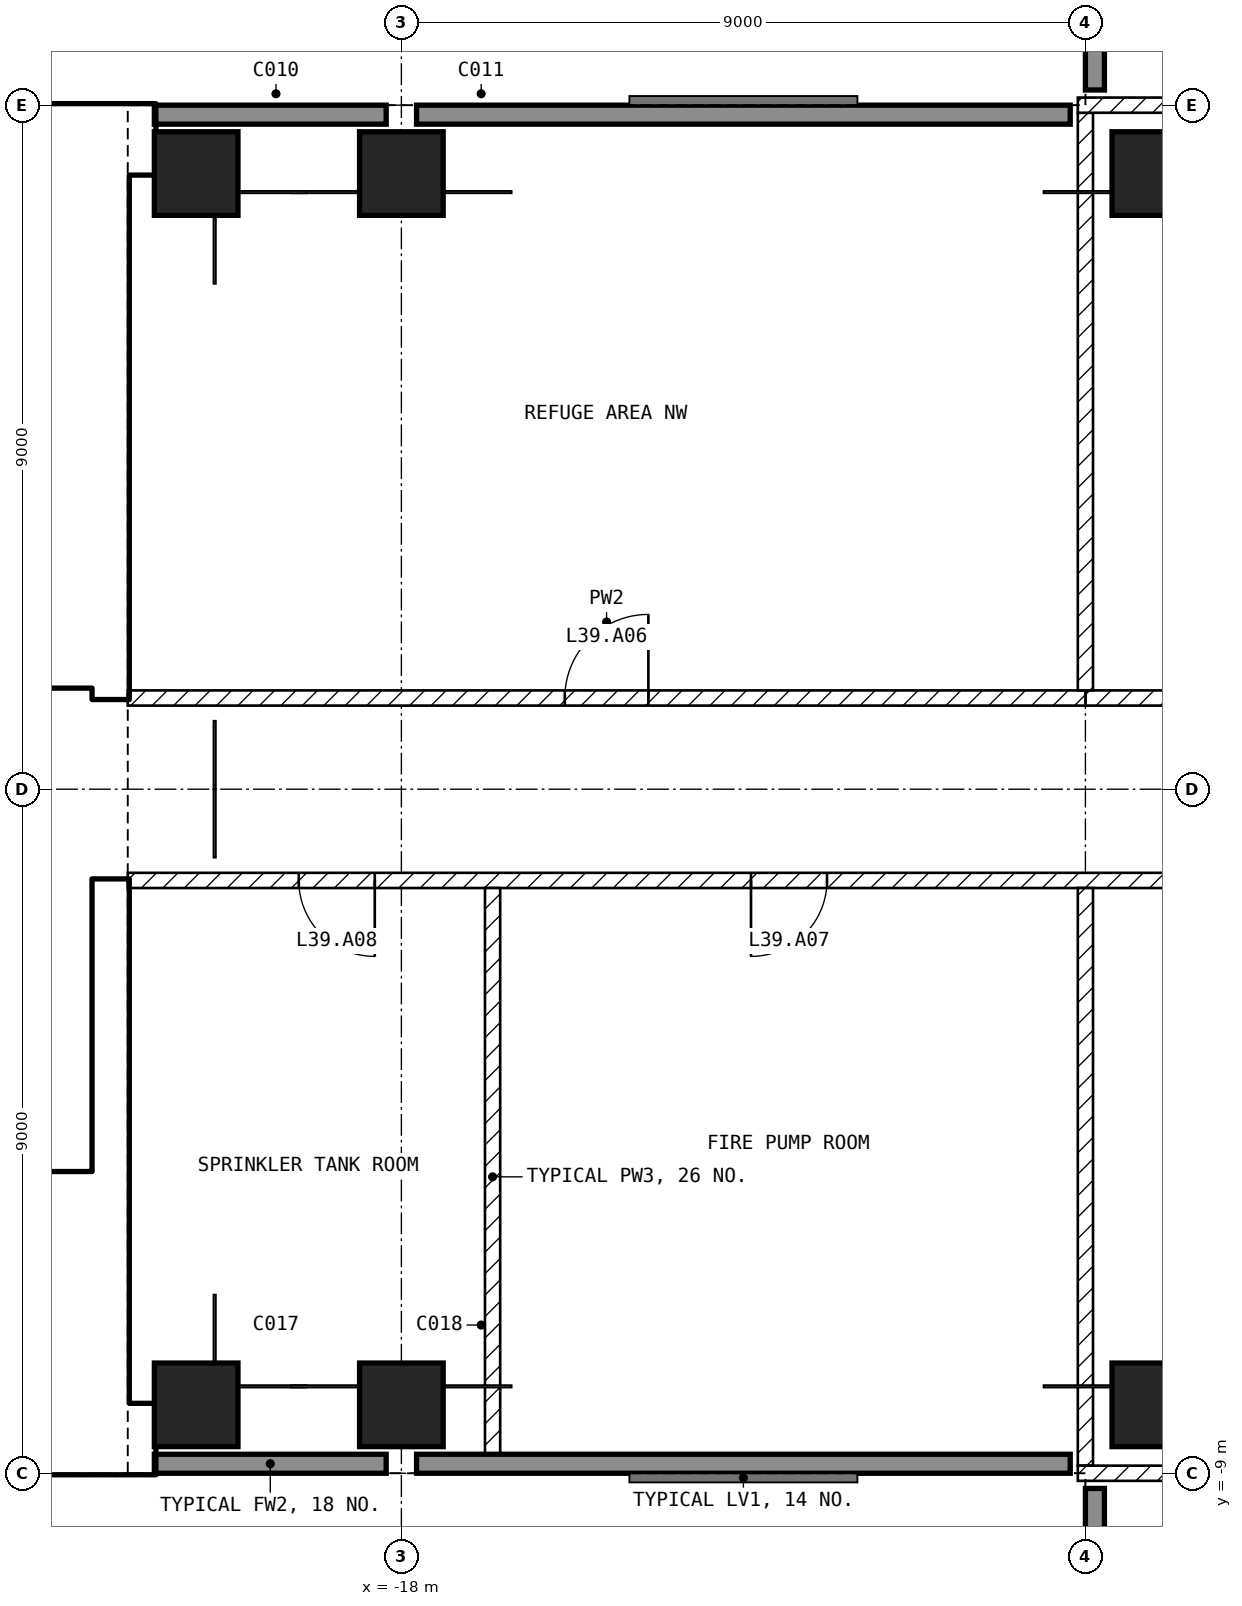
"""IFC4 building model, lengths in metres.
Left out: names, types, materials, properties, quantities, classifications, styles, units other than length and angle.
Written with IfcOpenShell. Run it as: python <this file> out.ifc"""

import sys

from ifc_helpers import new_model, si_unit, direction, frame, frame_2d, origin, origin_2d, place, context, subcontext, project, spatial, rectangle, extrude, element, fill, save


model = new_model("IFC4")
c1 = context("Model", 3, precision=1e-05, world=origin(), true_north=direction((0.0, 1.0)))
c2 = subcontext(c1, "Body", "Model", "MODEL_VIEW")
j1 = project(units=[si_unit("LENGTHUNIT", "METRE"), si_unit("PLANEANGLEUNIT", "RADIAN")], contexts=[c1])
p1 = place(None, origin())
s1 = spatial("IfcSite", under=j1, at=p1, CompositionType="ELEMENT")
p2 = place(p1, origin())
s2 = spatial("IfcBuilding", under=s1, at=p2, CompositionType="ELEMENT")
p3 = place(p2, frame((0.0, 0.0, 162.1)))
s3 = spatial("IfcBuildingStorey", under=s2, at=p3, CompositionType="ELEMENT", Elevation=162.1)
for number, where, z_axis, x_axis in (
    (1, (-20.7, -8.1, -0.45), (0.0, 0.0, 1.0), (1.0, 0.0, 0.0)),
    (2, (-20.7, 8.1, -0.45), (0.0, 0.0, 1.0), (1.0, 0.0, 0.0)),
    (3, (-18.0, -8.1, -0.45), (0.0, 0.0, 1.0), (1.0, 0.0, 0.0)),
    (4, (-18.0, 8.1, -0.45), (0.0, 0.0, 1.0), (1.0, 0.0, 0.0)),
    (5, (-8.1, -8.1, -0.45), (0.0, 0.0, 1.0), (1.0, 0.0, 0.0)),
    (6, (-8.1, 8.1, -0.45), (0.0, 0.0, 1.0), (1.0, 0.0, 0.0)),
):
    element("IfcColumn", number, at=place(p3, frame(where, z_axis=z_axis, x_axis=x_axis)), inside=s3, PredefinedType="COLUMN", context=c2, shape_type="SweptSolid", body=[
        extrude(rectangle(XDim=1.1, YDim=1.1, at=origin_2d()), origin(), (0.0, 0.0, 1.0), 4.7),
    ])
p4 = place(p3, frame((-8.875, 17.8, 0.0), z_axis=(0.0, 0.0, 1.0), x_axis=(0.0, -1.0, 0.0)))
e7 = element("IfcWall", 7, at=p4, inside=s3, PredefinedType="SOLIDWALL", context=c2, shape_type="SweptSolid", body=[
    extrude(rectangle(XDim=8.6, YDim=0.25, at=frame_2d((4.3, 0.0))), origin(), (0.0, 0.0, 1.0), 4.25),
])
p5 = place(p4, frame((2.8, 0.0, 1.0)))
e8 = element("IfcOpeningElement", 8, at=p5, cuts=e7, PredefinedType="OPENING", context=c2, shape_type="SweptSolid", body=[
    extrude(rectangle(XDim=3.0, YDim=2.4, at=frame_2d((1.5, 1.2))), frame((0.0, 0.135, 0.0), z_axis=(0.0, -1.0, 0.0), x_axis=(1.0, 0.0, 0.0)), (0.0, 0.0, 1.0), 0.27),
])
p6 = place(p3, frame((-9.2, 8.875, 0.0), z_axis=(0.0, 0.0, 1.0), x_axis=(-1.0, 0.0, 0.0)))
e9 = element("IfcWall", 9, at=p6, inside=s3, PredefinedType="SOLIDWALL", context=c2, shape_type="SweptSolid", body=[
    extrude(rectangle(XDim=8.6, YDim=0.25, at=frame_2d((4.3, 0.0))), origin(), (0.0, 0.0, 1.0), 4.25),
])
for number, where, z_axis, x_axis in (
    (10, (-18.2, 8.875, 0.0), (0.0, 0.0, 1.0), (-1.0, 0.0, 0.0)),
    (11, (-21.25, -8.875, 0.0), (0.0, 0.0, 1.0), (1.0, 0.0, 0.0)),
):
    element("IfcWall", number, at=place(p3, frame(where, z_axis=z_axis, x_axis=x_axis)), inside=s3, PredefinedType="SOLIDWALL", context=c2, shape_type="SweptSolid", body=[
        extrude(rectangle(XDim=3.05, YDim=0.25, at=frame_2d((1.525, 0.0))), origin(), (0.0, 0.0, 1.0), 4.25),
    ])
for number, where, z_axis, x_axis in (
    (12, (-17.8, -8.875, 0.0), (0.0, 0.0, 1.0), (1.0, 0.0, 0.0)),
    (13, (-8.875, -9.2, 0.0), (0.0, 0.0, 1.0), (0.0, -1.0, 0.0)),
):
    element("IfcWall", number, at=place(p3, frame(where, z_axis=z_axis, x_axis=x_axis)), inside=s3, PredefinedType="SOLIDWALL", context=c2, shape_type="SweptSolid", body=[
        extrude(rectangle(XDim=8.6, YDim=0.25, at=frame_2d((4.3, 0.0))), origin(), (0.0, 0.0, 1.0), 4.25),
    ])
p7 = place(p3, frame((-30.2, -8.55, 0.0), z_axis=(0.0, 0.0, 1.0), x_axis=(1.0, 0.0, 0.0)))
e14 = element("IfcWall", 14, at=p7, inside=s3, PredefinedType="SHEAR", context=c2, shape_type="SweptSolid", body=[
    extrude(rectangle(XDim=8.95, YDim=0.9, at=frame_2d((4.475, 0.0))), origin(), (0.0, 0.0, 1.0), 4.25),
])
p8 = place(p3, frame((-29.6, 8.55, 0.0), z_axis=(0.0, 0.0, 1.0), x_axis=(1.0, 0.0, 0.0)))
e15 = element("IfcWall", 15, at=p8, inside=s3, PredefinedType="SHEAR", context=c2, shape_type="SweptSolid", body=[
    extrude(rectangle(XDim=8.35, YDim=0.9, at=frame_2d((4.175, 0.0))), origin(), (0.0, 0.0, 1.0), 4.25),
])
for number, where, z_axis, x_axis in (
    (16, (-21.825, -8.1, 0.0), (0.0, 0.0, 1.0), (0.0, 1.0, 0.0)),
    (17, (-21.825, 1.2, 0.0), (0.0, 0.0, 1.0), (0.0, 1.0, 0.0)),
):
    element("IfcWall", number, at=place(p3, frame(where, z_axis=z_axis, x_axis=x_axis)), inside=s3, PredefinedType="SHEAR", context=c2, shape_type="SweptSolid", body=[
        extrude(rectangle(XDim=6.9, YDim=0.45, at=frame_2d((3.45, 0.0))), origin(), (0.0, 0.0, 1.0), 4.25),
    ])
p9 = place(p3, frame((-33.2, 1.45, 0.0), z_axis=(0.0, 0.0, 1.0), x_axis=(1.0, 0.0, 0.0)))
e18 = element("IfcWall", 18, at=p9, inside=s3, PredefinedType="SOLIDWALL", context=c2, shape_type="SweptSolid", body=[
    extrude(rectangle(XDim=11.15, YDim=0.2, at=frame_2d((5.575, 0.0))), origin(), (0.0, 0.0, 1.0), 4.25),
])
p10 = place(p9, frame((9.4, 0.0, 0.0)))
e19 = element("IfcOpeningElement", 19, at=p10, cuts=e18, PredefinedType="OPENING", context=c2, shape_type="SweptSolid", body=[
    extrude(rectangle(XDim=1.0, YDim=2.1, at=frame_2d((0.5, 1.05))), frame((0.0, 0.11, 0.0), z_axis=(0.0, -1.0, 0.0), x_axis=(1.0, 0.0, 0.0)), (0.0, 0.0, 1.0), 0.22),
])
p11 = place(p9, frame((6.9, 0.0, 0.0)))
e20 = element("IfcOpeningElement", 20, at=p11, cuts=e18, PredefinedType="OPENING", context=c2, shape_type="SweptSolid", body=[
    extrude(rectangle(XDim=1.0, YDim=2.1, at=frame_2d((0.5, 1.05))), frame((0.0, 0.11, 0.0), z_axis=(0.0, -1.0, 0.0), x_axis=(1.0, 0.0, 0.0)), (0.0, 0.0, 1.0), 0.22),
])
p12 = place(p9, frame((1.1, 0.0, 0.0)))
e21 = element("IfcOpeningElement", 21, at=p12, cuts=e18, PredefinedType="OPENING", context=c2, shape_type="SweptSolid", body=[
    extrude(rectangle(XDim=0.9, YDim=2.1, at=frame_2d((0.45, 1.05))), frame((0.0, 0.11, 0.0), z_axis=(0.0, -1.0, 0.0), x_axis=(1.0, 0.0, 0.0)), (0.0, 0.0, 1.0), 0.22),
])
p13 = place(p3, frame((-28.35, 5.15, 0.0), z_axis=(0.0, 0.0, 1.0), x_axis=(1.0, 0.0, 0.0)))
e22 = element("IfcWall", 22, at=p13, inside=s3, PredefinedType="SOLIDWALL", context=c2, shape_type="SweptSolid", body=[
    extrude(rectangle(XDim=6.3, YDim=0.2, at=frame_2d((3.15, 0.0))), origin(), (0.0, 0.0, 1.0), 4.25),
])
p14 = place(p13, frame((5.1, 0.0, 0.0)))
e23 = element("IfcOpeningElement", 23, at=p14, cuts=e22, PredefinedType="OPENING", context=c2, shape_type="SweptSolid", body=[
    extrude(rectangle(XDim=1.0, YDim=2.1, at=frame_2d((0.5, 1.05))), frame((0.0, 0.11, 0.0), z_axis=(0.0, -1.0, 0.0), x_axis=(1.0, 0.0, 0.0)), (0.0, 0.0, 1.0), 0.22),
])
p15 = place(p3, frame((-28.35, -5.15, 0.0), z_axis=(0.0, 0.0, 1.0), x_axis=(1.0, 0.0, 0.0)))
e24 = element("IfcWall", 24, at=p15, inside=s3, PredefinedType="SOLIDWALL", context=c2, shape_type="SweptSolid", body=[
    extrude(rectangle(XDim=6.3, YDim=0.2, at=frame_2d((3.15, 0.0))), origin(), (0.0, 0.0, 1.0), 4.25),
])
p16 = place(p15, frame((5.1, 0.0, 0.0)))
e25 = element("IfcOpeningElement", 25, at=p16, cuts=e24, PredefinedType="OPENING", context=c2, shape_type="SweptSolid", body=[
    extrude(rectangle(XDim=1.0, YDim=2.1, at=frame_2d((0.5, 1.05))), frame((0.0, 0.11, 0.0), z_axis=(0.0, -1.0, 0.0), x_axis=(1.0, 0.0, 0.0)), (0.0, 0.0, 1.0), 0.22),
])
p17 = place(p3, frame((-9.0, 1.2, 0.0), z_axis=(0.0, 0.0, 1.0), x_axis=(1.0, 0.0, 0.0)))
e26 = element("IfcWall", 26, at=p17, inside=s3, PredefinedType="PARTITIONING", context=c2, shape_type="SweptSolid", body=[
    extrude(rectangle(XDim=30.6, YDim=0.2, at=frame_2d((15.3, 0.0))), origin(), (0.0, 0.0, 1.0), 4.25),
])
p18 = place(p17, frame((8.5, 0.0, 0.0)))
e27 = element("IfcOpeningElement", 27, at=p18, cuts=e26, PredefinedType="OPENING", context=c2, shape_type="SweptSolid", body=[
    extrude(rectangle(XDim=1.0, YDim=2.1, at=frame_2d((0.5, 1.05))), frame((0.0, 0.11, 0.0), z_axis=(0.0, -1.0, 0.0), x_axis=(1.0, 0.0, 0.0)), (0.0, 0.0, 1.0), 0.22),
])
p19 = place(p17, frame((21.4, 0.0, 0.0)))
e28 = element("IfcOpeningElement", 28, at=p19, cuts=e26, PredefinedType="OPENING", context=c2, shape_type="SweptSolid", body=[
    extrude(rectangle(XDim=1.0, YDim=2.1, at=frame_2d((0.5, 1.05))), frame((0.0, 0.11, 0.0), z_axis=(0.0, -1.0, 0.0), x_axis=(1.0, 0.0, 0.0)), (0.0, 0.0, 1.0), 0.22),
])
p20 = place(p17, frame((27.35, 0.0, 0.0)))
e29 = element("IfcOpeningElement", 29, at=p20, cuts=e26, PredefinedType="OPENING", context=c2, shape_type="SweptSolid", body=[
    extrude(rectangle(XDim=1.0, YDim=2.1, at=frame_2d((0.5, 1.05))), frame((0.0, 0.11, 0.0), z_axis=(0.0, -1.0, 0.0), x_axis=(1.0, 0.0, 0.0)), (0.0, 0.0, 1.0), 0.22),
])
p21 = place(p3, frame((9.0, -1.2, 0.0), z_axis=(0.0, 0.0, 1.0), x_axis=(-1.0, 0.0, 0.0)))
e30 = element("IfcWall", 30, at=p21, inside=s3, PredefinedType="PARTITIONING", context=c2, shape_type="SweptSolid", body=[
    extrude(rectangle(XDim=30.6, YDim=0.2, at=frame_2d((15.3, 0.0))), origin(), (0.0, 0.0, 1.0), 4.25),
])
p22 = place(p21, frame((8.5, 0.0, 0.0)))
e31 = element("IfcOpeningElement", 31, at=p22, cuts=e30, PredefinedType="OPENING", context=c2, shape_type="SweptSolid", body=[
    extrude(rectangle(XDim=1.0, YDim=2.1, at=frame_2d((0.5, 1.05))), frame((0.0, 0.11, 0.0), z_axis=(0.0, -1.0, 0.0), x_axis=(1.0, 0.0, 0.0)), (0.0, 0.0, 1.0), 0.22),
])
p23 = place(p21, frame((21.4, 0.0, 0.0)))
e32 = element("IfcOpeningElement", 32, at=p23, cuts=e30, PredefinedType="OPENING", context=c2, shape_type="SweptSolid", body=[
    extrude(rectangle(XDim=1.0, YDim=2.1, at=frame_2d((0.5, 1.05))), frame((0.0, 0.11, 0.0), z_axis=(0.0, -1.0, 0.0), x_axis=(1.0, 0.0, 0.0)), (0.0, 0.0, 1.0), 0.22),
])
p24 = place(p21, frame((27.35, 0.0, 0.0)))
e33 = element("IfcOpeningElement", 33, at=p24, cuts=e30, PredefinedType="OPENING", context=c2, shape_type="SweptSolid", body=[
    extrude(rectangle(XDim=1.0, YDim=2.1, at=frame_2d((0.5, 1.05))), frame((0.0, 0.11, 0.0), z_axis=(0.0, -1.0, 0.0), x_axis=(1.0, 0.0, 0.0)), (0.0, 0.0, 1.0), 0.22),
])
p25 = place(p3, frame((-21.6, 1.2, 0.0), z_axis=(0.0, 0.0, 1.0), x_axis=(1.0, 0.0, 0.0)))
e34 = element("IfcWall", 34, at=p25, inside=s3, PredefinedType="PARTITIONING", context=c2, shape_type="SweptSolid", body=[
    extrude(rectangle(XDim=12.6, YDim=0.2, at=frame_2d((6.3, 0.0))), origin(), (0.0, 0.0, 1.0), 4.25),
])
p26 = place(p25, frame((5.75, 0.0, 0.0)))
e35 = element("IfcOpeningElement", 35, at=p26, cuts=e34, PredefinedType="OPENING", context=c2, shape_type="SweptSolid", body=[
    extrude(rectangle(XDim=1.1, YDim=2.1, at=frame_2d((0.55, 1.05))), frame((0.0, 0.11, 0.0), z_axis=(0.0, -1.0, 0.0), x_axis=(1.0, 0.0, 0.0)), (0.0, 0.0, 1.0), 0.22),
])
p27 = place(p3, frame((-9.0, 1.3, 0.0), z_axis=(0.0, 0.0, 1.0), x_axis=(0.0, 1.0, 0.0)))
e36 = element("IfcWall", 36, at=p27, inside=s3, PredefinedType="PARTITIONING", context=c2, shape_type="SweptSolid", body=[
    extrude(rectangle(XDim=7.6, YDim=0.2, at=frame_2d((3.8, 0.0))), origin(), (0.0, 0.0, 1.0), 4.25),
])
p28 = place(p3, frame((-9.1, 9.0, 0.0), z_axis=(0.0, 0.0, 1.0), x_axis=(1.0, 0.0, 0.0)))
e37 = element("IfcWall", 37, at=p28, inside=s3, PredefinedType="PARTITIONING", context=c2, shape_type="SweptSolid", body=[
    extrude(rectangle(XDim=18.2, YDim=0.2, at=frame_2d((9.1, 0.0))), origin(), (0.0, 0.0, 1.0), 4.25),
])
p29 = place(p28, frame((8.6, 0.0, 0.0)))
e38 = element("IfcOpeningElement", 38, at=p29, cuts=e37, PredefinedType="OPENING", context=c2, shape_type="SweptSolid", body=[
    extrude(rectangle(XDim=1.0, YDim=2.1, at=frame_2d((0.5, 1.05))), frame((0.0, 0.11, 0.0), z_axis=(0.0, -1.0, 0.0), x_axis=(1.0, 0.0, 0.0)), (0.0, 0.0, 1.0), 0.22),
])
p30 = place(p3, frame((-9.0, -8.9, 0.0), z_axis=(0.0, 0.0, 1.0), x_axis=(0.0, 1.0, 0.0)))
e39 = element("IfcWall", 39, at=p30, inside=s3, PredefinedType="PARTITIONING", context=c2, shape_type="SweptSolid", body=[
    extrude(rectangle(XDim=7.6, YDim=0.2, at=frame_2d((3.8, 0.0))), origin(), (0.0, 0.0, 1.0), 4.25),
])
p31 = place(p3, frame((9.1, -9.0, 0.0), z_axis=(0.0, 0.0, 1.0), x_axis=(-1.0, 0.0, 0.0)))
e40 = element("IfcWall", 40, at=p31, inside=s3, PredefinedType="PARTITIONING", context=c2, shape_type="SweptSolid", body=[
    extrude(rectangle(XDim=18.2, YDim=0.2, at=frame_2d((9.1, 0.0))), origin(), (0.0, 0.0, 1.0), 4.25),
])
p32 = place(p31, frame((8.6, 0.0, 0.0)))
e41 = element("IfcOpeningElement", 41, at=p32, cuts=e40, PredefinedType="OPENING", context=c2, shape_type="SweptSolid", body=[
    extrude(rectangle(XDim=1.0, YDim=2.1, at=frame_2d((0.5, 1.05))), frame((0.0, 0.11, 0.0), z_axis=(0.0, -1.0, 0.0), x_axis=(1.0, 0.0, 0.0)), (0.0, 0.0, 1.0), 0.22),
])
p33 = place(p3, frame((-16.8, -8.9, 0.0), z_axis=(0.0, 0.0, 1.0), x_axis=(0.0, 1.0, 0.0)))
e42 = element("IfcWall", 42, at=p33, inside=s3, PredefinedType="PARTITIONING", context=c2, shape_type="SweptSolid", body=[
    extrude(rectangle(XDim=7.6, YDim=0.2, at=frame_2d((3.8, 0.0))), origin(), (0.0, 0.0, 1.0), 4.25),
])
p34 = place(p16, origin())
e43 = element("IfcDoor", 43, at=p34, inside=s3, OperationType="SINGLE_SWING_LEFT", PredefinedType="DOOR", context=c2, shape_type="SweptSolid", body=[
    extrude(rectangle(XDim=1.0, YDim=2.1, at=frame_2d((0.5, 1.05))), frame((0.0, 0.025, 0.0), z_axis=(0.0, -1.0, 0.0), x_axis=(1.0, 0.0, 0.0)), (0.0, 0.0, 1.0), 0.05),
])
fill(e25, e43)
p35 = place(p14, origin())
e44 = element("IfcDoor", 44, at=p35, inside=s3, OperationType="SINGLE_SWING_LEFT", PredefinedType="DOOR", context=c2, shape_type="SweptSolid", body=[
    extrude(rectangle(XDim=1.0, YDim=2.1, at=frame_2d((0.5, 1.05))), frame((0.0, 0.025, 0.0), z_axis=(0.0, -1.0, 0.0), x_axis=(1.0, 0.0, 0.0)), (0.0, 0.0, 1.0), 0.05),
])
fill(e23, e44)
p36 = place(p26, origin())
e45 = element("IfcDoor", 45, at=p36, inside=s3, OperationType="SINGLE_SWING_RIGHT", PredefinedType="DOOR", context=c2, shape_type="SweptSolid", body=[
    extrude(rectangle(XDim=1.1, YDim=2.1, at=frame_2d((0.55, 1.05))), frame((0.0, 0.025, 0.0), z_axis=(0.0, -1.0, 0.0), x_axis=(1.0, 0.0, 0.0)), (0.0, 0.0, 1.0), 0.05),
])
fill(e35, e45)
p37 = place(p23, origin())
e46 = element("IfcDoor", 46, at=p37, inside=s3, OperationType="SINGLE_SWING_RIGHT", PredefinedType="DOOR", context=c2, shape_type="SweptSolid", body=[
    extrude(rectangle(XDim=1.0, YDim=2.1, at=frame_2d((0.5, 1.05))), frame((0.0, 0.025, 0.0), z_axis=(0.0, -1.0, 0.0), x_axis=(1.0, 0.0, 0.0)), (0.0, 0.0, 1.0), 0.05),
])
fill(e32, e46)
p38 = place(p24, origin())
e47 = element("IfcDoor", 47, at=p38, inside=s3, OperationType="SINGLE_SWING_LEFT", PredefinedType="DOOR", context=c2, shape_type="SweptSolid", body=[
    extrude(rectangle(XDim=1.0, YDim=2.1, at=frame_2d((0.5, 1.05))), frame((0.0, 0.025, 0.0), z_axis=(0.0, -1.0, 0.0), x_axis=(1.0, 0.0, 0.0)), (0.0, 0.0, 1.0), 0.05),
])
fill(e33, e47)
save(model, sys.argv[1])
